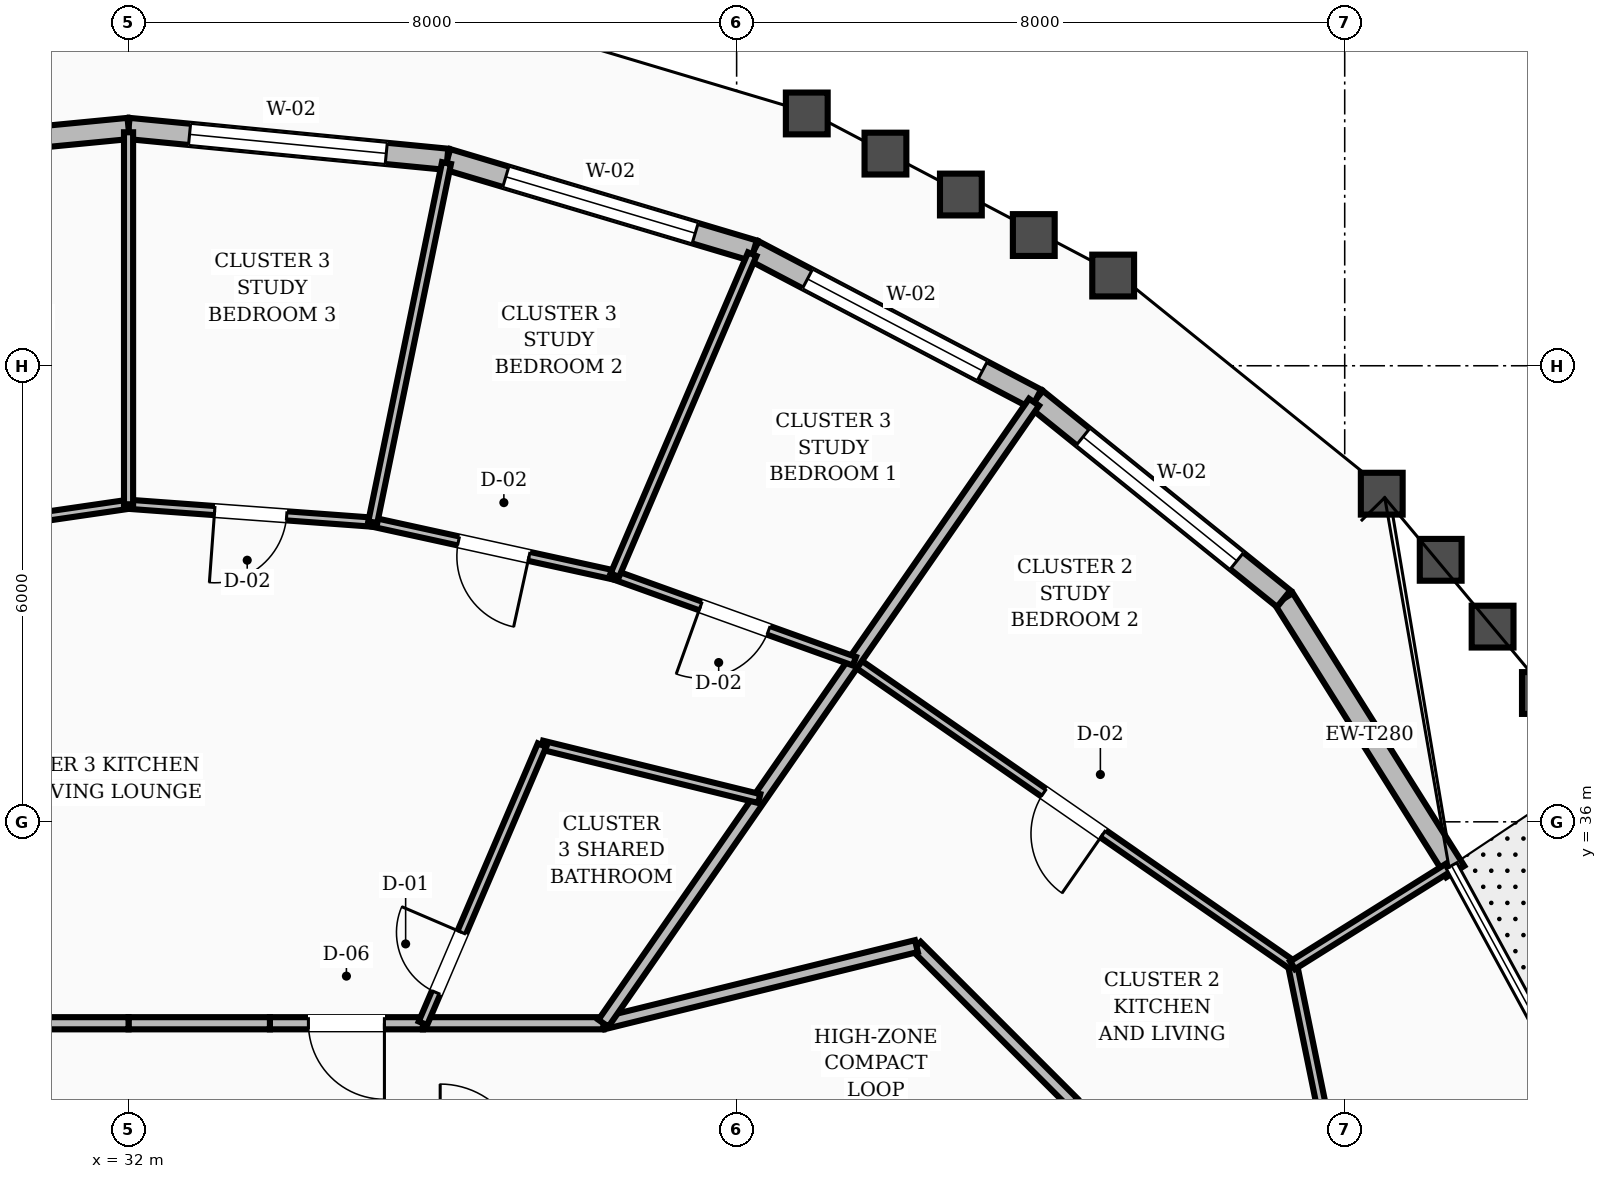
"""IFC4 building model, lengths in metres.
Left out: names, types, materials, properties, quantities, classifications, styles, units other than length and angle.
Written with IfcOpenShell. Run it as: python <this file> out.ifc"""

import sys

from ifc_helpers import new_model, si_unit, direction, frame, frame_2d, origin, place, context, subcontext, project, spatial, rectangle, extrude, element, fill, save


model = new_model("IFC4")
c1 = context("Model", 3, precision=1e-05, world=origin(), true_north=direction((0.0, 1.0)))
c2 = subcontext(c1, "Body", "Model", "MODEL_VIEW")
j1 = project(units=[si_unit("LENGTHUNIT", "METRE"), si_unit("PLANEANGLEUNIT", "RADIAN")], contexts=[c1])
p1 = place(None, origin())
s1 = spatial("IfcSite", under=j1, at=p1, CompositionType="ELEMENT")
p2 = place(p1, origin())
s2 = spatial("IfcBuilding", under=s1, at=p2, CompositionType="ELEMENT")
p3 = place(p2, frame((0.0, 0.0, 243.6)))
s3 = spatial("IfcBuildingStorey", under=s2, at=p3, CompositionType="ELEMENT", Elevation=243.6)
p4 = place(p3, frame((49.454, 35.346, 0.0), z_axis=(0.0, 0.0, 1.0), x_axis=(-0.532176262315, 0.846633584161, 0.0)))
e1 = element("IfcWall", 1, at=p4, inside=s3, PredefinedType="STANDARD", context=c2, shape_type="SweptSolid", body=[
    extrude(rectangle(XDim=4.24, YDim=0.28, at=frame_2d((2.12, 0.0))), origin(), (0.0, 0.0, 1.0), 2.88),
])
p5 = place(p3, frame((47.198, 38.935, 0.0), z_axis=(0.0, 0.0, 1.0), x_axis=(-0.778409360575, 0.627757012999, 0.0)))
e2 = element("IfcWall", 2, at=p5, inside=s3, PredefinedType="STANDARD", context=c2, shape_type="SweptSolid", body=[
    extrude(rectangle(XDim=4.184, YDim=0.28, at=frame_2d((2.092, 0.0))), origin(), (0.0, 0.0, 1.0), 2.88),
])
p6 = place(p5, frame((0.792, 0.0, 0.8)))
e3 = element("IfcOpeningElement", 3, at=p6, cuts=e2, PredefinedType="OPENING", context=c2, shape_type="SweptSolid", body=[
    extrude(rectangle(XDim=2.6, YDim=1.65, at=frame_2d((1.3, 0.825))), frame((0.0, 0.15, 0.0), z_axis=(0.0, -1.0, 0.0), x_axis=(1.0, 0.0, 0.0)), (0.0, 0.0, 1.0), 0.3),
])
p7 = place(p3, frame((43.941, 41.562, 0.0), z_axis=(0.0, 0.0, 1.0), x_axis=(-0.885290153249, 0.46503907853, 0.0)))
e4 = element("IfcWall", 4, at=p7, inside=s3, PredefinedType="STANDARD", context=c2, shape_type="SweptSolid", body=[
    extrude(rectangle(XDim=4.197, YDim=0.28, at=frame_2d((2.099, 0.0))), origin(), (0.0, 0.0, 1.0), 2.88),
])
p8 = place(p7, frame((0.799, 0.0, 0.8)))
e5 = element("IfcOpeningElement", 5, at=p8, cuts=e4, PredefinedType="OPENING", context=c2, shape_type="SweptSolid", body=[
    extrude(rectangle(XDim=2.6, YDim=1.65, at=frame_2d((1.3, 0.825))), frame((0.0, 0.15, 0.0), z_axis=(0.0, -1.0, 0.0), x_axis=(1.0, 0.0, 0.0)), (0.0, 0.0, 1.0), 0.3),
])
p9 = place(p3, frame((40.225, 43.514, 0.0), z_axis=(0.0, 0.0, 1.0), x_axis=(-0.958312014412, 0.285723788009, 0.0)))
e6 = element("IfcWall", 6, at=p9, inside=s3, PredefinedType="STANDARD", context=c2, shape_type="SweptSolid", body=[
    extrude(rectangle(XDim=4.207, YDim=0.28, at=frame_2d((2.104, 0.0))), origin(), (0.0, 0.0, 1.0), 2.88),
])
p10 = place(p9, frame((0.804, 0.0, 0.8)))
e7 = element("IfcOpeningElement", 7, at=p10, cuts=e6, PredefinedType="OPENING", context=c2, shape_type="SweptSolid", body=[
    extrude(rectangle(XDim=2.6, YDim=1.65, at=frame_2d((1.3, 0.825))), frame((0.0, 0.15, 0.0), z_axis=(0.0, -1.0, 0.0), x_axis=(1.0, 0.0, 0.0)), (0.0, 0.0, 1.0), 0.3),
])
p11 = place(p3, frame((36.193, 44.716, 0.0), z_axis=(0.0, 0.0, 1.0), x_axis=(-0.995350551252, 0.096318638497, 0.0)))
e8 = element("IfcWall", 8, at=p11, inside=s3, PredefinedType="STANDARD", context=c2, shape_type="SweptSolid", body=[
    extrude(rectangle(XDim=4.213, YDim=0.28, at=frame_2d((2.106, 0.0))), origin(), (0.0, 0.0, 1.0), 2.88),
])
p12 = place(p11, frame((0.806, 0.0, 0.8)))
e9 = element("IfcOpeningElement", 9, at=p12, cuts=e8, PredefinedType="OPENING", context=c2, shape_type="SweptSolid", body=[
    extrude(rectangle(XDim=2.6, YDim=1.65, at=frame_2d((1.3, 0.825))), frame((0.0, 0.15, 0.0), z_axis=(0.0, -1.0, 0.0), x_axis=(1.0, 0.0, 0.0)), (0.0, 0.0, 1.0), 0.3),
])
p13 = place(p3, frame((32.0, 45.122, 0.0), z_axis=(0.0, 0.0, 1.0), x_axis=(-0.995350551252, -0.096318638497, 0.0)))
e10 = element("IfcWall", 10, at=p13, inside=s3, PredefinedType="STANDARD", context=c2, shape_type="SweptSolid", body=[
    extrude(rectangle(XDim=4.213, YDim=0.28, at=frame_2d((2.106, 0.0))), origin(), (0.0, 0.0, 1.0), 2.88),
])
p14 = place(p3, frame((44.427, 32.303, 0.0), z_axis=(0.0, 0.0, 1.0), x_axis=(-0.707106781187, 0.707106781187, 0.0)))
e11 = element("IfcWall", 11, at=p14, inside=s3, PredefinedType="SOLIDWALL", context=c2, shape_type="SweptSolid", body=[
    extrude(rectangle(XDim=2.916, YDim=0.16, at=frame_2d((1.458, 0.0))), origin(), (0.0, 0.0, 1.0), 2.87),
])
p15 = place(p3, frame((42.365, 34.365, 0.0), z_axis=(0.0, 0.0, 1.0), x_axis=(-0.970939799552, -0.239323850978, 0.0)))
e12 = element("IfcWall", 12, at=p15, inside=s3, PredefinedType="SOLIDWALL", context=c2, shape_type="SweptSolid", body=[
    extrude(rectangle(XDim=4.241, YDim=0.16, at=frame_2d((2.12, 0.0))), origin(), (0.0, 0.0, 1.0), 2.87),
])
p16 = place(p3, frame((38.248, 33.35, 0.0), z_axis=(0.0, 0.0, 1.0), x_axis=(-1.0, 0.0, 0.0)))
e13 = element("IfcWall", 13, at=p16, inside=s3, PredefinedType="SOLIDWALL", context=c2, shape_type="SweptSolid", body=[
    extrude(rectangle(XDim=2.375, YDim=0.16, at=frame_2d((1.188, 0.0))), origin(), (0.0, 0.0, 1.0), 2.87),
])
p17 = place(p3, frame((35.873, 33.35, 0.0), z_axis=(0.0, 0.0, 1.0), x_axis=(-1.0, 0.0, 0.0)))
e14 = element("IfcWall", 14, at=p17, inside=s3, PredefinedType="SOLIDWALL", context=c2, shape_type="SweptSolid", body=[
    extrude(rectangle(XDim=2.013, YDim=0.16, at=frame_2d((1.006, 0.0))), origin(), (0.0, 0.0, 1.0), 2.87),
])
p18 = place(p17, frame((0.507, 0.0, 0.0)))
e15 = element("IfcOpeningElement", 15, at=p18, cuts=e14, PredefinedType="OPENING", context=c2, shape_type="SweptSolid", body=[
    extrude(rectangle(XDim=1.0, YDim=2.1, at=frame_2d((0.5, 1.05))), frame((0.0, 0.09, 0.0), z_axis=(0.0, -1.0, 0.0), x_axis=(1.0, 0.0, 0.0)), (0.0, 0.0, 1.0), 0.18),
])
for number, where, z_axis, x_axis in (
    (16, (33.86, 33.35, 0.0), (0.0, 0.0, 1.0), (-1.0, 0.0, 0.0)),
    (17, (32.0, 33.35, 0.0), (0.0, 0.0, 1.0), (-1.0, 0.0, 0.0)),
):
    element("IfcWall", number, at=place(p3, frame(where, z_axis=z_axis, x_axis=x_axis)), inside=s3, PredefinedType="SOLIDWALL", context=c2, shape_type="SweptSolid", body=[
        extrude(rectangle(XDim=1.86, YDim=0.16, at=frame_2d((0.93, 0.0))), origin(), (0.0, 0.0, 1.0), 2.87),
    ])
p19 = place(p3, frame((49.383, 24.0, 0.0), z_axis=(0.0, 0.0, 1.0), x_axis=(-0.200398815881, 0.979714404607, 0.0)))
e18 = element("IfcWall", 18, at=p19, inside=s3, PredefinedType="PARTITIONING", context=c2, shape_type="SweptSolid", body=[
    extrude(rectangle(XDim=10.323, YDim=0.12, at=frame_2d((5.161, 0.0))), origin(), (0.0, 0.0, 1.0), 2.87),
])
p20 = place(p19, frame((6.554, 0.0, 0.0)))
e19 = element("IfcOpeningElement", 19, at=p20, cuts=e18, PredefinedType="OPENING", context=c2, shape_type="SweptSolid", body=[
    extrude(rectangle(XDim=0.95, YDim=2.1, at=frame_2d((0.475, 1.05))), frame((0.0, 0.07, 0.0), z_axis=(0.0, -1.0, 0.0), x_axis=(1.0, 0.0, 0.0)), (0.0, 0.0, 1.0), 0.14),
])
p21 = place(p3, frame((47.314, 34.113, 0.0), z_axis=(0.0, 0.0, 1.0), x_axis=(-0.821574143978, 0.570101680358, 0.0)))
e20 = element("IfcWall", 20, at=p21, inside=s3, PredefinedType="PARTITIONING", context=c2, shape_type="SweptSolid", body=[
    extrude(rectangle(XDim=7.016, YDim=0.12, at=frame_2d((3.508, 0.0))), origin(), (0.0, 0.0, 1.0), 2.87),
])
p22 = place(p21, frame((3.033, 0.0, 0.0)))
e21 = element("IfcOpeningElement", 21, at=p22, cuts=e20, PredefinedType="OPENING", context=c2, shape_type="SweptSolid", body=[
    extrude(rectangle(XDim=0.95, YDim=2.1, at=frame_2d((0.475, 1.05))), frame((0.0, 0.07, 0.0), z_axis=(0.0, -1.0, 0.0), x_axis=(1.0, 0.0, 0.0)), (0.0, 0.0, 1.0), 0.14),
])
p23 = place(p3, frame((47.314, 34.113, 0.0), z_axis=(0.0, 0.0, 1.0), x_axis=(0.847333885664, 0.5310605297, 0.0)))
e22 = element("IfcWall", 22, at=p23, inside=s3, PredefinedType="PARTITIONING", context=c2, shape_type="SweptSolid", body=[
    extrude(rectangle(XDim=2.418, YDim=0.12, at=frame_2d((1.209, 0.0))), origin(), (0.0, 0.0, 1.0), 2.87),
])
p24 = place(p3, frame((38.248, 33.35, 0.0), z_axis=(0.0, 0.0, 1.0), x_axis=(0.56977166182, 0.821803050242, 0.0)))
e23 = element("IfcWall", 23, at=p24, inside=s3, PredefinedType="SOLIDWALL", context=c2, shape_type="SweptSolid", body=[
    extrude(rectangle(XDim=9.943, YDim=0.16, at=frame_2d((4.971, 0.0))), origin(), (0.0, 0.0, 1.0), 2.87),
])
p25 = place(p3, frame((40.297, 36.306, 0.0), z_axis=(0.0, 0.0, 1.0), x_axis=(-0.971072323886, 0.238785556061, 0.0)))
e24 = element("IfcWall", 24, at=p25, inside=s3, PredefinedType="PARTITIONING", context=c2, shape_type="SweptSolid", body=[
    extrude(rectangle(XDim=2.943, YDim=0.12, at=frame_2d((1.471, 0.0))), origin(), (0.0, 0.0, 1.0), 2.87),
])
p26 = place(p3, frame((35.873, 33.35, 0.0), z_axis=(0.0, 0.0, 1.0), x_axis=(0.393660187427, 0.919256034429, 0.0)))
e25 = element("IfcWall", 25, at=p26, inside=s3, PredefinedType="PARTITIONING", context=c2, shape_type="SweptSolid", body=[
    extrude(rectangle(XDim=3.98, YDim=0.12, at=frame_2d((1.99, 0.0))), origin(), (0.0, 0.0, 1.0), 2.87),
])
p27 = place(p26, frame((0.44, 0.0, 0.0)))
e26 = element("IfcOpeningElement", 26, at=p27, cuts=e25, PredefinedType="OPENING", context=c2, shape_type="SweptSolid", body=[
    extrude(rectangle(XDim=0.86, YDim=2.1, at=frame_2d((0.43, 1.05))), frame((0.0, 0.07, 0.0), z_axis=(0.0, -1.0, 0.0), x_axis=(1.0, 0.0, 0.0)), (0.0, 0.0, 1.0), 0.14),
])
p28 = place(p3, frame((41.55, 38.113, 0.0), z_axis=(0.0, 0.0, 1.0), x_axis=(-0.94115841408, 0.337965737326, 0.0)))
e27 = element("IfcWall", 27, at=p28, inside=s3, PredefinedType="PARTITIONING", context=c2, shape_type="SweptSolid", body=[
    extrude(rectangle(XDim=3.35, YDim=0.12, at=frame_2d((1.675, 0.0))), origin(), (0.0, 0.0, 1.0), 2.87),
])
p29 = place(p28, frame((1.2, 0.0, 0.0)))
e28 = element("IfcOpeningElement", 28, at=p29, cuts=e27, PredefinedType="OPENING", context=c2, shape_type="SweptSolid", body=[
    extrude(rectangle(XDim=0.95, YDim=2.1, at=frame_2d((0.475, 1.05))), frame((0.0, 0.07, 0.0), z_axis=(0.0, -1.0, 0.0), x_axis=(1.0, 0.0, 0.0)), (0.0, 0.0, 1.0), 0.14),
])
p30 = place(p3, frame((38.397, 39.245, 0.0), z_axis=(0.0, 0.0, 1.0), x_axis=(-0.976852106819, 0.213915781098, 0.0)))
e29 = element("IfcWall", 29, at=p30, inside=s3, PredefinedType="PARTITIONING", context=c2, shape_type="SweptSolid", body=[
    extrude(rectangle(XDim=3.26, YDim=0.12, at=frame_2d((1.63, 0.0))), origin(), (0.0, 0.0, 1.0), 2.87),
])
p31 = place(p30, frame((1.155, 0.0, 0.0)))
e30 = element("IfcOpeningElement", 30, at=p31, cuts=e29, PredefinedType="OPENING", context=c2, shape_type="SweptSolid", body=[
    extrude(rectangle(XDim=0.95, YDim=2.1, at=frame_2d((0.475, 1.05))), frame((0.0, 0.07, 0.0), z_axis=(0.0, -1.0, 0.0), x_axis=(1.0, 0.0, 0.0)), (0.0, 0.0, 1.0), 0.14),
])
p32 = place(p3, frame((38.397, 39.245, 0.0), z_axis=(0.0, 0.0, 1.0), x_axis=(0.393604976549, 0.919279675853, 0.0)))
e31 = element("IfcWall", 31, at=p32, inside=s3, PredefinedType="PARTITIONING", context=c2, shape_type="SweptSolid", body=[
    extrude(rectangle(XDim=4.594, YDim=0.12, at=frame_2d((2.297, 0.0))), origin(), (0.0, 0.0, 1.0), 2.87),
])
p33 = place(p3, frame((35.213, 39.942, 0.0), z_axis=(0.0, 0.0, 1.0), x_axis=(-0.997333723592, 0.072975638312, 0.0)))
e32 = element("IfcWall", 32, at=p33, inside=s3, PredefinedType="PARTITIONING", context=c2, shape_type="SweptSolid", body=[
    extrude(rectangle(XDim=3.222, YDim=0.12, at=frame_2d((1.611, 0.0))), origin(), (0.0, 0.0, 1.0), 2.87),
])
p34 = place(p33, frame((1.136, 0.0, 0.0)))
e33 = element("IfcOpeningElement", 33, at=p34, cuts=e32, PredefinedType="OPENING", context=c2, shape_type="SweptSolid", body=[
    extrude(rectangle(XDim=0.95, YDim=2.1, at=frame_2d((0.475, 1.05))), frame((0.0, 0.07, 0.0), z_axis=(0.0, -1.0, 0.0), x_axis=(1.0, 0.0, 0.0)), (0.0, 0.0, 1.0), 0.14),
])
p35 = place(p3, frame((35.213, 39.942, 0.0), z_axis=(0.0, 0.0, 1.0), x_axis=(0.201107301766, 0.979569218165, 0.0)))
e34 = element("IfcWall", 34, at=p35, inside=s3, PredefinedType="PARTITIONING", context=c2, shape_type="SweptSolid", body=[
    extrude(rectangle(XDim=4.823, YDim=0.12, at=frame_2d((2.412, 0.0))), origin(), (0.0, 0.0, 1.0), 2.87),
])
p36 = place(p3, frame((32.0, 40.177, 0.0), z_axis=(0.0, 0.0, 1.0), x_axis=(-0.989545223303, -0.144222921337, 0.0)))
e35 = element("IfcWall", 35, at=p36, inside=s3, PredefinedType="PARTITIONING", context=c2, shape_type="SweptSolid", body=[
    extrude(rectangle(XDim=6.465, YDim=0.12, at=frame_2d((3.232, 0.0))), origin(), (0.0, 0.0, 1.0), 2.87),
])
p37 = place(p36, frame((2.757, 0.0, 0.0)))
e36 = element("IfcOpeningElement", 36, at=p37, cuts=e35, PredefinedType="OPENING", context=c2, shape_type="SweptSolid", body=[
    extrude(rectangle(XDim=0.95, YDim=2.1, at=frame_2d((0.475, 1.05))), frame((0.0, 0.07, 0.0), z_axis=(0.0, -1.0, 0.0), x_axis=(1.0, 0.0, 0.0)), (0.0, 0.0, 1.0), 0.14),
])
p38 = place(p3, frame((32.0, 40.177, 0.0), z_axis=(0.0, 0.0, 1.0), x_axis=(0.0, 1.0, 0.0)))
e37 = element("IfcWall", 37, at=p38, inside=s3, PredefinedType="PARTITIONING", context=c2, shape_type="SweptSolid", body=[
    extrude(rectangle(XDim=4.894, YDim=0.12, at=frame_2d((2.447, 0.0))), origin(), (0.0, 0.0, 1.0), 2.87),
])
p39 = place(p6, origin())
e38 = element("IfcWindow", 38, at=p39, inside=s3, PartitioningType="SINGLE_PANEL", PredefinedType="WINDOW", context=c2, shape_type="SweptSolid", body=[
    extrude(rectangle(XDim=2.6, YDim=1.65, at=frame_2d((1.3, 0.825))), frame((0.0, 0.03, 0.0), z_axis=(0.0, -1.0, 0.0), x_axis=(1.0, 0.0, 0.0)), (0.0, 0.0, 1.0), 0.06),
])
fill(e3, e38)
p40 = place(p8, origin())
e39 = element("IfcWindow", 39, at=p40, inside=s3, PartitioningType="SINGLE_PANEL", PredefinedType="WINDOW", context=c2, shape_type="SweptSolid", body=[
    extrude(rectangle(XDim=2.6, YDim=1.65, at=frame_2d((1.3, 0.825))), frame((0.0, 0.03, 0.0), z_axis=(0.0, -1.0, 0.0), x_axis=(1.0, 0.0, 0.0)), (0.0, 0.0, 1.0), 0.06),
])
fill(e5, e39)
p41 = place(p10, origin())
e40 = element("IfcWindow", 40, at=p41, inside=s3, PartitioningType="SINGLE_PANEL", PredefinedType="WINDOW", context=c2, shape_type="SweptSolid", body=[
    extrude(rectangle(XDim=2.6, YDim=1.65, at=frame_2d((1.3, 0.825))), frame((0.0, 0.03, 0.0), z_axis=(0.0, -1.0, 0.0), x_axis=(1.0, 0.0, 0.0)), (0.0, 0.0, 1.0), 0.06),
])
fill(e7, e40)
p42 = place(p12, origin())
e41 = element("IfcWindow", 41, at=p42, inside=s3, PartitioningType="SINGLE_PANEL", PredefinedType="WINDOW", context=c2, shape_type="SweptSolid", body=[
    extrude(rectangle(XDim=2.6, YDim=1.65, at=frame_2d((1.3, 0.825))), frame((0.0, 0.03, 0.0), z_axis=(0.0, -1.0, 0.0), x_axis=(1.0, 0.0, 0.0)), (0.0, 0.0, 1.0), 0.06),
])
fill(e9, e41)
p43 = place(p22, origin())
e42 = element("IfcDoor", 42, at=p43, inside=s3, OperationType="SINGLE_SWING_LEFT", PredefinedType="DOOR", context=c2, shape_type="SweptSolid", body=[
    extrude(rectangle(XDim=0.95, YDim=2.1, at=frame_2d((0.475, 1.05))), frame((0.0, 0.025, 0.0), z_axis=(0.0, -1.0, 0.0), x_axis=(1.0, 0.0, 0.0)), (0.0, 0.0, 1.0), 0.05),
])
fill(e21, e42)
p44 = place(p27, origin())
e43 = element("IfcDoor", 43, at=p44, inside=s3, OperationType="SINGLE_SWING_RIGHT", PredefinedType="DOOR", context=c2, shape_type="SweptSolid", body=[
    extrude(rectangle(XDim=0.86, YDim=2.1, at=frame_2d((0.43, 1.05))), frame((0.0, 0.025, 0.0), z_axis=(0.0, -1.0, 0.0), x_axis=(1.0, 0.0, 0.0)), (0.0, 0.0, 1.0), 0.05),
])
fill(e26, e43)
p45 = place(p18, origin())
e44 = element("IfcDoor", 44, at=p45, inside=s3, OperationType="SINGLE_SWING_LEFT", PredefinedType="DOOR", context=c2, shape_type="SweptSolid", body=[
    extrude(rectangle(XDim=1.0, YDim=2.1, at=frame_2d((0.5, 1.05))), frame((0.0, 0.025, 0.0), z_axis=(0.0, -1.0, 0.0), x_axis=(1.0, 0.0, 0.0)), (0.0, 0.0, 1.0), 0.05),
])
fill(e15, e44)
p46 = place(p29, origin())
e45 = element("IfcDoor", 45, at=p46, inside=s3, OperationType="SINGLE_SWING_RIGHT", PredefinedType="DOOR", context=c2, shape_type="SweptSolid", body=[
    extrude(rectangle(XDim=0.95, YDim=2.1, at=frame_2d((0.475, 1.05))), frame((0.0, 0.025, 0.0), z_axis=(0.0, -1.0, 0.0), x_axis=(1.0, 0.0, 0.0)), (0.0, 0.0, 1.0), 0.05),
])
fill(e28, e45)
p47 = place(p31, origin())
e46 = element("IfcDoor", 46, at=p47, inside=s3, OperationType="SINGLE_SWING_LEFT", PredefinedType="DOOR", context=c2, shape_type="SweptSolid", body=[
    extrude(rectangle(XDim=0.95, YDim=2.1, at=frame_2d((0.475, 1.05))), frame((0.0, 0.025, 0.0), z_axis=(0.0, -1.0, 0.0), x_axis=(1.0, 0.0, 0.0)), (0.0, 0.0, 1.0), 0.05),
])
fill(e30, e46)
p48 = place(p34, origin())
e47 = element("IfcDoor", 47, at=p48, inside=s3, OperationType="SINGLE_SWING_RIGHT", PredefinedType="DOOR", context=c2, shape_type="SweptSolid", body=[
    extrude(rectangle(XDim=0.95, YDim=2.1, at=frame_2d((0.475, 1.05))), frame((0.0, 0.025, 0.0), z_axis=(0.0, -1.0, 0.0), x_axis=(1.0, 0.0, 0.0)), (0.0, 0.0, 1.0), 0.05),
])
fill(e33, e47)
save(model, sys.argv[1])
